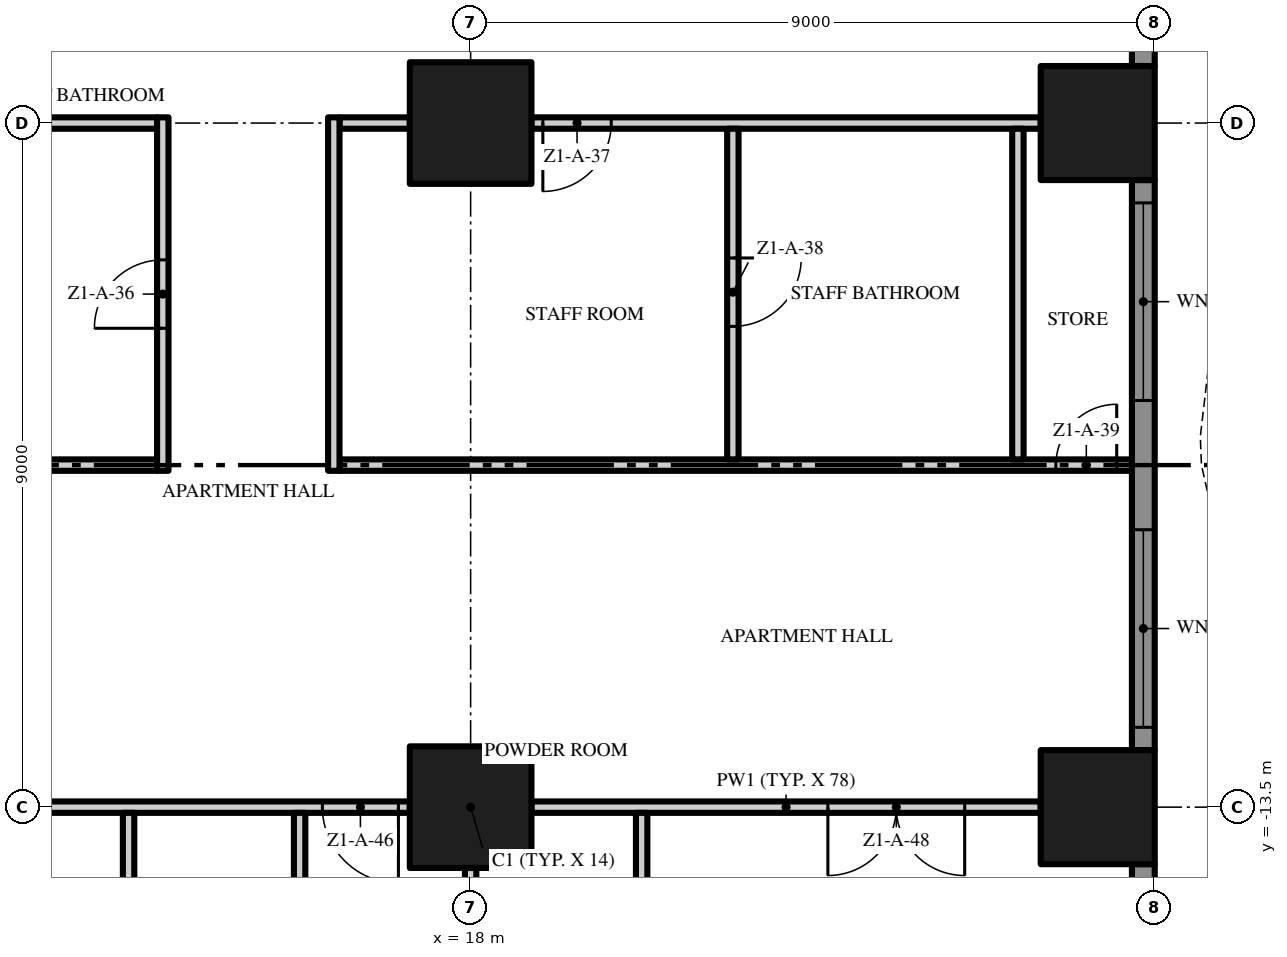
"""IFC4 building model, lengths in metres.
Left out: names, types, materials, properties, quantities, classifications, styles, units other than length and angle.
Written with IfcOpenShell. Run it as: python <this file> out.ifc"""

import sys

from ifc_helpers import new_model, si_unit, direction, frame, frame_2d, origin, origin_2d, place, context, subcontext, project, spatial, polyline, rectangle, outline, extrude, element, fill, save


model = new_model("IFC4")
c1 = context("Model", 3, precision=1e-05, world=origin(), true_north=direction((0.0, 1.0)))
c2 = subcontext(c1, "Body", "Model", "MODEL_VIEW")
j1 = project(units=[si_unit("LENGTHUNIT", "METRE"), si_unit("PLANEANGLEUNIT", "RADIAN")], contexts=[c1])
p1 = place(None, origin())
s1 = spatial("IfcSite", under=j1, at=p1, CompositionType="ELEMENT")
p2 = place(p1, origin())
s2 = spatial("IfcBuilding", under=s1, at=p2, CompositionType="ELEMENT")
p3 = place(p2, frame((0.0, 0.0, 18.8)))
s3 = spatial("IfcBuildingStorey", under=s2, at=p3, CompositionType="ELEMENT", Elevation=18.8)
for number, where, z_axis, x_axis in (
    (1, (18.0, -13.5, 0.0), (0.0, 0.0, 1.0), (1.0, 0.0, 0.0)),
    (2, (18.0, -4.5, 0.0), (0.0, 0.0, 1.0), (1.0, 0.0, 0.0)),
):
    element("IfcColumn", number, at=place(p3, frame(where, z_axis=z_axis, x_axis=x_axis)), inside=s3, PredefinedType="COLUMN", context=c2, shape_type="SweptSolid", body=[
        extrude(rectangle(XDim=1.6, YDim=1.6, at=origin_2d()), origin(), (0.0, 0.0, 1.0), 3.5),
    ])
for number, where, z_axis, x_axis in (
    (3, (26.25, -13.5, 0.0), (0.0, 0.0, 1.0), (1.0, 0.0, 0.0)),
    (4, (26.25, -4.5, 0.0), (0.0, 0.0, 1.0), (1.0, 0.0, 0.0)),
):
    element("IfcColumn", number, at=place(p3, frame(where, z_axis=z_axis, x_axis=x_axis)), inside=s3, PredefinedType="COLUMN", context=c2, shape_type="SweptSolid", body=[
        extrude(rectangle(XDim=1.5, YDim=1.5, at=origin_2d()), origin(), (0.0, 0.0, 1.0), 3.5),
    ])
p4 = place(p3, frame((26.85, -14.25, 0.0), z_axis=(0.0, 0.0, 1.0), x_axis=(0.0, -1.0, 0.0)))
e5 = element("IfcWall", 5, at=p4, inside=s3, PredefinedType="SOLIDWALL", context=c2, shape_type="SweptSolid", body=[
    extrude(rectangle(XDim=3.45, YDim=0.3, at=frame_2d((1.725, 0.0))), origin(), (0.0, 0.0, 1.0), 3.5),
])
p5 = place(p4, frame((0.3, 0.0, 0.0)))
e6 = element("IfcOpeningElement", 6, at=p5, cuts=e5, PredefinedType="OPENING", context=c2, shape_type="SweptSolid", body=[
    extrude(rectangle(XDim=2.6, YDim=2.4, at=frame_2d((1.3, 1.2))), frame((0.0, 0.16, 0.0), z_axis=(0.0, -1.0, 0.0), x_axis=(1.0, 0.0, 0.0)), (0.0, 0.0, 1.0), 0.32),
])
p6 = place(p3, frame((26.85, -5.25, 0.0), z_axis=(0.0, 0.0, 1.0), x_axis=(0.0, -1.0, 0.0)))
e7 = element("IfcWall", 7, at=p6, inside=s3, PredefinedType="SOLIDWALL", context=c2, shape_type="SweptSolid", body=[
    extrude(rectangle(XDim=7.5, YDim=0.3, at=frame_2d((3.75, 0.0))), origin(), (0.0, 0.0, 1.0), 3.5),
])
p7 = place(p6, frame((4.6, 0.0, 0.45)))
e8 = element("IfcOpeningElement", 8, at=p7, cuts=e7, PredefinedType="OPENING", context=c2, shape_type="SweptSolid", body=[
    extrude(rectangle(XDim=2.6, YDim=2.65, at=frame_2d((1.3, 1.325))), frame((0.0, 0.16, 0.0), z_axis=(0.0, -1.0, 0.0), x_axis=(1.0, 0.0, 0.0)), (0.0, 0.0, 1.0), 0.32),
])
p8 = place(p6, frame((0.3, 0.0, 0.45)))
e9 = element("IfcOpeningElement", 9, at=p8, cuts=e7, PredefinedType="OPENING", context=c2, shape_type="SweptSolid", body=[
    extrude(rectangle(XDim=2.6, YDim=2.65, at=frame_2d((1.3, 1.325))), frame((0.0, 0.16, 0.0), z_axis=(0.0, -1.0, 0.0), x_axis=(1.0, 0.0, 0.0)), (0.0, 0.0, 1.0), 0.32),
])
p9 = place(p3, frame((26.85, 3.75, 0.0), z_axis=(0.0, 0.0, 1.0), x_axis=(0.0, -1.0, 0.0)))
e10 = element("IfcWall", 10, at=p9, inside=s3, PredefinedType="SOLIDWALL", context=c2, shape_type="SweptSolid", body=[
    extrude(rectangle(XDim=7.5, YDim=0.3, at=frame_2d((3.75, 0.0))), origin(), (0.0, 0.0, 1.0), 3.5),
])
p10 = place(p9, frame((4.6, 0.0, 0.0)))
e11 = element("IfcOpeningElement", 11, at=p10, cuts=e10, PredefinedType="OPENING", context=c2, shape_type="SweptSolid", body=[
    extrude(rectangle(XDim=2.6, YDim=2.4, at=frame_2d((1.3, 1.2))), frame((0.0, 0.16, 0.0), z_axis=(0.0, -1.0, 0.0), x_axis=(1.0, 0.0, 0.0)), (0.0, 0.0, 1.0), 0.32),
])
p11 = place(p9, frame((0.3, 0.0, 0.45)))
e12 = element("IfcOpeningElement", 12, at=p11, cuts=e10, PredefinedType="OPENING", context=c2, shape_type="SweptSolid", body=[
    extrude(rectangle(XDim=2.6, YDim=2.65, at=frame_2d((1.3, 1.325))), frame((0.0, 0.16, 0.0), z_axis=(0.0, -1.0, 0.0), x_axis=(1.0, 0.0, 0.0)), (0.0, 0.0, 1.0), 0.32),
])
p12 = place(p3, origin())
e13 = element("IfcWall", 13, at=p12, inside=s3, PredefinedType="USERDEFINED", context=c2, shape_type="SweptSolid", body=[
    extrude(outline(polyline([(29.649, -18.0), (29.985, -16.5), (30.0, -16.125), (29.869, -15.0), (29.345, -13.5), (28.612, -12.0), (27.951, -10.5), (27.615, -9.0), (27.6, -8.625), (27.731, -7.5), (28.255, -6.0), (28.988, -4.5), (29.649, -3.0), (29.985, -1.5), (30.0, -1.125), (29.869, 0.0), (29.345, 1.5), (28.612, 3.0), (27.951, 4.5), (27.615, 6.0), (27.6, 6.375), (27.731, 7.5), (28.255, 9.0), (28.988, 10.5), (29.649, 12.0), (29.985, 13.5), (30.0, 13.875), (29.869, 15.0), (29.345, 16.5), (28.612, 18.0), (28.388, 17.89), (29.114, 16.404), (29.624, 14.944), (29.749, 13.865), (29.736, 13.533), (29.41, 12.079), (28.761, 10.605), (28.024, 9.096), (27.486, 7.556), (27.349, 6.385), (27.366, 5.967), (27.713, 4.421), (28.385, 2.895), (29.114, 1.404), (29.624, -0.056), (29.749, -1.135), (29.736, -1.467), (29.41, -2.921), (28.761, -4.395), (28.024, -5.904), (27.486, -7.444), (27.349, -8.615), (27.366, -9.033), (27.713, -10.579), (28.385, -12.105), (29.114, -13.596), (29.624, -15.056), (29.749, -16.135), (29.736, -16.467), (29.405, -17.945), (29.649, -18.0)])), origin(), (0.0, 0.0, 1.0), 0.9),
])
p13 = place(p3, frame((17.2, -13.5, 0.0), z_axis=(0.0, 0.0, 1.0), x_axis=(-1.0, 0.0, 0.0)))
e14 = element("IfcWall", 14, at=p13, inside=s3, PredefinedType="PARTITIONING", context=c2, shape_type="SweptSolid", body=[
    extrude(rectangle(XDim=7.4, YDim=0.15, at=frame_2d((3.7, 0.0))), origin(), (0.0, 0.0, 1.0), 3.5),
])
p14 = place(p13, frame((6.25, 0.0, 0.0)))
e15 = element("IfcOpeningElement", 15, at=p14, cuts=e14, PredefinedType="OPENING", context=c2, shape_type="SweptSolid", body=[
    extrude(rectangle(XDim=1.0, YDim=2.4, at=frame_2d((0.5, 1.2))), frame((0.0, 0.085, 0.0), z_axis=(0.0, -1.0, 0.0), x_axis=(1.0, 0.0, 0.0)), (0.0, 0.0, 1.0), 0.17),
])
p15 = place(p13, frame((0.15, 0.0, 0.0)))
e16 = element("IfcOpeningElement", 16, at=p15, cuts=e14, PredefinedType="OPENING", context=c2, shape_type="SweptSolid", body=[
    extrude(rectangle(XDim=1.0, YDim=2.4, at=frame_2d((0.5, 1.2))), frame((0.0, 0.085, 0.0), z_axis=(0.0, -1.0, 0.0), x_axis=(1.0, 0.0, 0.0)), (0.0, 0.0, 1.0), 0.17),
])
p16 = place(p3, frame((25.5, -13.5, 0.0), z_axis=(0.0, 0.0, 1.0), x_axis=(-1.0, 0.0, 0.0)))
e17 = element("IfcWall", 17, at=p16, inside=s3, PredefinedType="PARTITIONING", context=c2, shape_type="SweptSolid", body=[
    extrude(rectangle(XDim=6.7, YDim=0.15, at=frame_2d((3.35, 0.0))), origin(), (0.0, 0.0, 1.0), 3.5),
])
p17 = place(p16, frame((1.0, 0.0, 0.0)))
e18 = element("IfcOpeningElement", 18, at=p17, cuts=e17, PredefinedType="OPENING", context=c2, shape_type="SweptSolid", body=[
    extrude(rectangle(XDim=1.8, YDim=2.4, at=frame_2d((0.9, 1.2))), frame((0.0, 0.085, 0.0), z_axis=(0.0, -1.0, 0.0), x_axis=(1.0, 0.0, 0.0)), (0.0, 0.0, 1.0), 0.17),
])
p18 = place(p3, frame((0.1, -9.0, 0.0), z_axis=(0.0, 0.0, 1.0), x_axis=(1.0, 0.0, 0.0)))
e19 = element("IfcWall", 19, at=p18, inside=s3, PredefinedType="PARTITIONING", context=c2, shape_type="SweptSolid", body=[
    extrude(rectangle(XDim=13.775, YDim=0.15, at=frame_2d((6.888, 0.0))), origin(), (0.0, 0.0, 1.0), 3.5),
])
p19 = place(p18, frame((8.1, 0.0, 0.0)))
e20 = element("IfcOpeningElement", 20, at=p19, cuts=e19, PredefinedType="OPENING", context=c2, shape_type="SweptSolid", body=[
    extrude(rectangle(XDim=1.0, YDim=2.4, at=frame_2d((0.5, 1.2))), frame((0.0, 0.085, 0.0), z_axis=(0.0, -1.0, 0.0), x_axis=(1.0, 0.0, 0.0)), (0.0, 0.0, 1.0), 0.17),
])
p20 = place(p3, frame((16.275, -9.0, 0.0), z_axis=(0.0, 0.0, 1.0), x_axis=(1.0, 0.0, 0.0)))
e21 = element("IfcWall", 21, at=p20, inside=s3, PredefinedType="PARTITIONING", context=c2, shape_type="SweptSolid", body=[
    extrude(rectangle(XDim=10.425, YDim=0.15, at=frame_2d((5.213, 0.0))), origin(), (0.0, 0.0, 1.0), 3.5),
])
p21 = place(p20, frame((9.425, 0.0, 0.0)))
e22 = element("IfcOpeningElement", 22, at=p21, cuts=e21, PredefinedType="OPENING", context=c2, shape_type="SweptSolid", body=[
    extrude(rectangle(XDim=0.8, YDim=2.0, at=frame_2d((0.4, 1.0))), frame((0.0, 0.085, 0.0), z_axis=(0.0, -1.0, 0.0), x_axis=(1.0, 0.0, 0.0)), (0.0, 0.0, 1.0), 0.17),
])
p22 = place(p3, frame((9.8, -4.5, 0.0), z_axis=(0.0, 0.0, 1.0), x_axis=(1.0, 0.0, 0.0)))
e23 = element("IfcWall", 23, at=p22, inside=s3, PredefinedType="PARTITIONING", context=c2, shape_type="SweptSolid", body=[
    extrude(rectangle(XDim=4.075, YDim=0.15, at=frame_2d((2.038, 0.0))), origin(), (0.0, 0.0, 1.0), 3.5),
])
p23 = place(p3, frame((16.275, -4.5, 0.0), z_axis=(0.0, 0.0, 1.0), x_axis=(1.0, 0.0, 0.0)))
e24 = element("IfcWall", 24, at=p23, inside=s3, PredefinedType="PARTITIONING", context=c2, shape_type="SweptSolid", body=[
    extrude(rectangle(XDim=0.925, YDim=0.15, at=frame_2d((0.463, 0.0))), origin(), (0.0, 0.0, 1.0), 3.5),
])
p24 = place(p3, frame((25.5, -4.5, 0.0), z_axis=(0.0, 0.0, 1.0), x_axis=(-1.0, 0.0, 0.0)))
e25 = element("IfcWall", 25, at=p24, inside=s3, PredefinedType="PARTITIONING", context=c2, shape_type="SweptSolid", body=[
    extrude(rectangle(XDim=6.7, YDim=0.15, at=frame_2d((3.35, 0.0))), origin(), (0.0, 0.0, 1.0), 3.5),
])
p25 = place(p24, frame((5.65, 0.0, 0.0)))
e26 = element("IfcOpeningElement", 26, at=p25, cuts=e25, PredefinedType="OPENING", context=c2, shape_type="SweptSolid", body=[
    extrude(rectangle(XDim=0.9, YDim=2.1, at=frame_2d((0.45, 1.05))), frame((0.0, 0.085, 0.0), z_axis=(0.0, -1.0, 0.0), x_axis=(1.0, 0.0, 0.0)), (0.0, 0.0, 1.0), 0.17),
])
p26 = place(p3, frame((13.5, -22.2, 0.0), z_axis=(0.0, 0.0, 1.0), x_axis=(0.0, 1.0, 0.0)))
e27 = element("IfcWall", 27, at=p26, inside=s3, PredefinedType="PARTITIONING", context=c2, shape_type="SweptSolid", body=[
    extrude(rectangle(XDim=8.625, YDim=0.15, at=frame_2d((4.312, 0.0))), origin(), (0.0, 0.0, 1.0), 3.5),
])
p27 = place(p3, frame((13.95, -9.075, 0.0), z_axis=(0.0, 0.0, 1.0), x_axis=(0.0, 1.0, 0.0)))
e28 = element("IfcWall", 28, at=p27, inside=s3, PredefinedType="PARTITIONING", context=c2, shape_type="SweptSolid", body=[
    extrude(rectangle(XDim=4.65, YDim=0.15, at=frame_2d((2.325, 0.0))), origin(), (0.0, 0.0, 1.0), 3.5),
])
p28 = place(p27, frame((1.875, 0.0, 0.0)))
e29 = element("IfcOpeningElement", 29, at=p28, cuts=e28, PredefinedType="OPENING", context=c2, shape_type="SweptSolid", body=[
    extrude(rectangle(XDim=0.9, YDim=2.1, at=frame_2d((0.45, 1.05))), frame((0.0, 0.085, 0.0), z_axis=(0.0, -1.0, 0.0), x_axis=(1.0, 0.0, 0.0)), (0.0, 0.0, 1.0), 0.17),
])
p29 = place(p3, frame((15.75, -16.575, 0.0), z_axis=(0.0, 0.0, 1.0), x_axis=(0.0, 1.0, 0.0)))
e30 = element("IfcWall", 30, at=p29, inside=s3, PredefinedType="PARTITIONING", context=c2, shape_type="SweptSolid", body=[
    extrude(rectangle(XDim=3.0, YDim=0.15, at=frame_2d((1.5, 0.0))), origin(), (0.0, 0.0, 1.0), 3.5),
])
p30 = place(p3, frame((16.2, -9.075, 0.0), z_axis=(0.0, 0.0, 1.0), x_axis=(0.0, 1.0, 0.0)))
e31 = element("IfcWall", 31, at=p30, inside=s3, PredefinedType="PARTITIONING", context=c2, shape_type="SweptSolid", body=[
    extrude(rectangle(XDim=4.65, YDim=0.15, at=frame_2d((2.325, 0.0))), origin(), (0.0, 0.0, 1.0), 3.5),
])
p31 = place(p3, frame((18.0, -21.0, 0.0), z_axis=(0.0, 0.0, 1.0), x_axis=(0.0, 1.0, 0.0)))
e32 = element("IfcWall", 32, at=p31, inside=s3, PredefinedType="PARTITIONING", context=c2, shape_type="SweptSolid", body=[
    extrude(rectangle(XDim=6.7, YDim=0.15, at=frame_2d((3.35, 0.0))), origin(), (0.0, 0.0, 1.0), 3.5),
])
p32 = place(p3, frame((20.25, -16.575, 0.0), z_axis=(0.0, 0.0, 1.0), x_axis=(0.0, 1.0, 0.0)))
e33 = element("IfcWall", 33, at=p32, inside=s3, PredefinedType="PARTITIONING", context=c2, shape_type="SweptSolid", body=[
    extrude(rectangle(XDim=3.0, YDim=0.15, at=frame_2d((1.5, 0.0))), origin(), (0.0, 0.0, 1.0), 3.5),
])
p33 = place(p3, frame((21.45, -4.575, 0.0), z_axis=(0.0, 0.0, 1.0), x_axis=(0.0, -1.0, 0.0)))
e34 = element("IfcWall", 34, at=p33, inside=s3, PredefinedType="PARTITIONING", context=c2, shape_type="SweptSolid", body=[
    extrude(rectangle(XDim=4.35, YDim=0.15, at=frame_2d((2.175, 0.0))), origin(), (0.0, 0.0, 1.0), 3.5),
])
p34 = place(p33, frame((1.7, 0.0, 0.0)))
e35 = element("IfcOpeningElement", 35, at=p34, cuts=e34, PredefinedType="OPENING", context=c2, shape_type="SweptSolid", body=[
    extrude(rectangle(XDim=0.9, YDim=2.1, at=frame_2d((0.45, 1.05))), frame((0.0, 0.085, 0.0), z_axis=(0.0, -1.0, 0.0), x_axis=(1.0, 0.0, 0.0)), (0.0, 0.0, 1.0), 0.17),
])
p35 = place(p3, frame((25.2, -8.925, 0.0), z_axis=(0.0, 0.0, 1.0), x_axis=(0.0, 1.0, 0.0)))
e36 = element("IfcWall", 36, at=p35, inside=s3, PredefinedType="PARTITIONING", context=c2, shape_type="SweptSolid", body=[
    extrude(rectangle(XDim=4.35, YDim=0.15, at=frame_2d((2.175, 0.0))), origin(), (0.0, 0.0, 1.0), 3.5),
])
p36 = place(p7, origin())
e37 = element("IfcWindow", 37, at=p36, inside=s3, PartitioningType="SINGLE_PANEL", PredefinedType="WINDOW", context=c2, shape_type="SweptSolid", body=[
    extrude(rectangle(XDim=2.6, YDim=2.65, at=frame_2d((1.3, 1.325))), frame((0.0, 0.03, 0.0), z_axis=(0.0, -1.0, 0.0), x_axis=(1.0, 0.0, 0.0)), (0.0, 0.0, 1.0), 0.06),
])
fill(e8, e37)
p37 = place(p8, origin())
e38 = element("IfcWindow", 38, at=p37, inside=s3, PartitioningType="SINGLE_PANEL", PredefinedType="WINDOW", context=c2, shape_type="SweptSolid", body=[
    extrude(rectangle(XDim=2.6, YDim=2.65, at=frame_2d((1.3, 1.325))), frame((0.0, 0.03, 0.0), z_axis=(0.0, -1.0, 0.0), x_axis=(1.0, 0.0, 0.0)), (0.0, 0.0, 1.0), 0.06),
])
fill(e9, e38)
p38 = place(p28, origin())
e39 = element("IfcDoor", 39, at=p38, inside=s3, OperationType="SINGLE_SWING_LEFT", PredefinedType="DOOR", context=c2, shape_type="SweptSolid", body=[
    extrude(rectangle(XDim=0.9, YDim=2.1, at=frame_2d((0.45, 1.05))), frame((0.0, 0.025, 0.0), z_axis=(0.0, -1.0, 0.0), x_axis=(1.0, 0.0, 0.0)), (0.0, 0.0, 1.0), 0.05),
])
fill(e29, e39)
p39 = place(p25, origin())
e40 = element("IfcDoor", 40, at=p39, inside=s3, OperationType="SINGLE_SWING_RIGHT", PredefinedType="DOOR", context=c2, shape_type="SweptSolid", body=[
    extrude(rectangle(XDim=0.9, YDim=2.1, at=frame_2d((0.45, 1.05))), frame((0.0, 0.025, 0.0), z_axis=(0.0, -1.0, 0.0), x_axis=(1.0, 0.0, 0.0)), (0.0, 0.0, 1.0), 0.05),
])
fill(e26, e40)
p40 = place(p34, origin())
e41 = element("IfcDoor", 41, at=p40, inside=s3, OperationType="SINGLE_SWING_LEFT", PredefinedType="DOOR", context=c2, shape_type="SweptSolid", body=[
    extrude(rectangle(XDim=0.9, YDim=2.1, at=frame_2d((0.45, 1.05))), frame((0.0, 0.025, 0.0), z_axis=(0.0, -1.0, 0.0), x_axis=(1.0, 0.0, 0.0)), (0.0, 0.0, 1.0), 0.05),
])
fill(e35, e41)
p41 = place(p21, origin())
e42 = element("IfcDoor", 42, at=p41, inside=s3, OperationType="SINGLE_SWING_RIGHT", PredefinedType="DOOR", context=c2, shape_type="SweptSolid", body=[
    extrude(rectangle(XDim=0.8, YDim=2.0, at=frame_2d((0.4, 1.0))), frame((0.0, 0.025, 0.0), z_axis=(0.0, -1.0, 0.0), x_axis=(1.0, 0.0, 0.0)), (0.0, 0.0, 1.0), 0.05),
])
fill(e22, e42)
p42 = place(p15, origin())
e43 = element("IfcDoor", 43, at=p42, inside=s3, OperationType="SINGLE_SWING_LEFT", PredefinedType="DOOR", context=c2, shape_type="SweptSolid", body=[
    extrude(rectangle(XDim=1.0, YDim=2.4, at=frame_2d((0.5, 1.2))), frame((0.0, 0.025, 0.0), z_axis=(0.0, -1.0, 0.0), x_axis=(1.0, 0.0, 0.0)), (0.0, 0.0, 1.0), 0.05),
])
fill(e16, e43)
p43 = place(p17, origin())
e44 = element("IfcDoor", 44, at=p43, inside=s3, OperationType="DOUBLE_DOOR_SINGLE_SWING", PredefinedType="DOOR", context=c2, shape_type="SweptSolid", body=[
    extrude(rectangle(XDim=1.8, YDim=2.4, at=frame_2d((0.9, 1.2))), frame((0.0, 0.025, 0.0), z_axis=(0.0, -1.0, 0.0), x_axis=(1.0, 0.0, 0.0)), (0.0, 0.0, 1.0), 0.05),
])
fill(e18, e44)
save(model, sys.argv[1])
